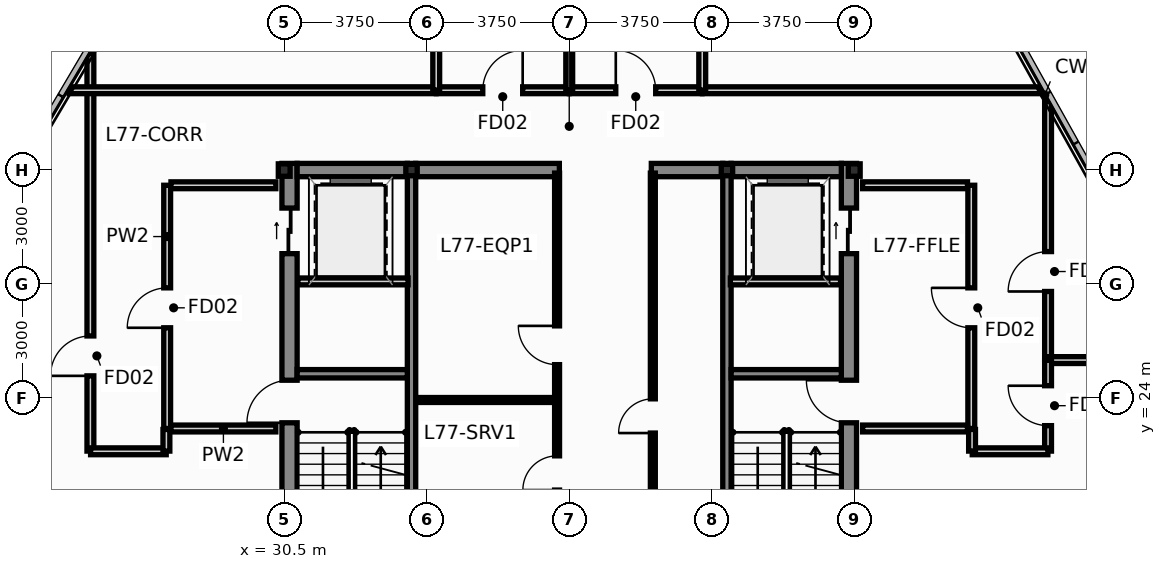
"""IFC4 building model, lengths in metres.
Left out: names, types, materials, properties, quantities, classifications, styles, units other than length and angle.
Written with IfcOpenShell. Run it as: python <this file> out.ifc"""

import sys

from ifc_helpers import new_model, si_unit, direction, frame, frame_2d, origin, origin_2d, place, context, subcontext, project, spatial, rectangle, hollow_rectangle, i_section, extrude, source, transform, mapped, element, fill, save


model = new_model("IFC4")
c1 = context("Model", 3, precision=1e-05, world=origin(), true_north=direction((0.0, 1.0)))
c2 = subcontext(c1, "Body", "Model", "MODEL_VIEW")
j1 = project(units=[si_unit("LENGTHUNIT", "METRE"), si_unit("PLANEANGLEUNIT", "RADIAN")], contexts=[c1])
p1 = place(None, origin())
s1 = spatial("IfcSite", under=j1, at=p1, CompositionType="ELEMENT")
p2 = place(p1, origin())
s2 = spatial("IfcBuilding", under=s1, at=p2, CompositionType="ELEMENT")
p3 = place(p2, frame((0.0, 0.0, 293.2)))
s3 = spatial("IfcBuildingStorey", under=s2, at=p3, CompositionType="ELEMENT", Elevation=293.2)
m1 = source(origin(), c2, "Body", "SweptSolid", [
    extrude(i_section(OverallWidth=0.311, OverallDepth=0.327, WebThickness=0.016, FlangeThickness=0.025, at=origin_2d()), origin(), (0.0, 0.0, 1.0), 3.4),
])
for number, where, z_axis, x_axis in (
    (1, (45.5, 30.0, 0.0), (0.0, 0.0, 1.0), (1.0, 0.0, 0.0)),
    (2, (30.5, 30.0, 0.0), (0.0, 0.0, 1.0), (1.0, 0.0, 0.0)),
):
    element("IfcColumn", number, at=place(p3, frame(where, z_axis=z_axis, x_axis=x_axis)), inside=s3, PredefinedType="COLUMN", context=c2, shape_type="MappedRepresentation", body=[
        mapped(m1, transform((0.0, 0.0, 0.0), scale=1.0)),
    ])
m2 = source(origin(), c2, "Body", "SweptSolid", [
    extrude(hollow_rectangle(XDim=0.3, YDim=0.3, WallThickness=0.012, at=origin_2d()), origin(), (0.0, 0.0, 1.0), 3.4),
])
for number, where, z_axis, x_axis in (
    (3, (33.85, 30.0, 0.0), (0.0, 0.0, 1.0), (1.0, 0.0, 0.0)),
    (4, (42.15, 30.0, 0.0), (0.0, 0.0, 1.0), (1.0, 0.0, 0.0)),
):
    element("IfcColumn", number, at=place(p3, frame(where, z_axis=z_axis, x_axis=x_axis)), inside=s3, PredefinedType="COLUMN", context=c2, shape_type="MappedRepresentation", body=[
        mapped(m2, transform((0.0, 0.0, 0.0), scale=1.0)),
    ])
p4 = place(p3, frame((30.64, 17.05, 0.0), z_axis=(0.0, 0.0, 1.0), x_axis=(0.0, 1.0, 0.0)))
e5 = element("IfcWall", 5, at=p4, inside=s3, PredefinedType="SHEAR", context=c2, shape_type="SweptSolid", body=[
    extrude(rectangle(XDim=13.125, YDim=0.4, at=frame_2d((6.562, 0.0))), origin(), (0.0, 0.0, 1.0), 3.4),
])
p5 = place(p4, frame((6.3, 0.0, 0.0)))
e6 = element("IfcOpeningElement", 6, at=p5, cuts=e5, PredefinedType="OPENING", context=c2, shape_type="SweptSolid", body=[
    extrude(rectangle(XDim=1.12, YDim=2.15, at=frame_2d((0.56, 1.075))), frame((0.0, 0.212, 0.0), z_axis=(0.0, -1.0, 0.0), x_axis=(1.0, 0.0, 0.0)), (0.0, 0.0, 1.0), 0.424),
])
p6 = place(p4, frame((10.75, 0.0, 0.0)))
e7 = element("IfcOpeningElement", 7, at=p6, cuts=e5, PredefinedType="OPENING", context=c2, shape_type="SweptSolid", body=[
    extrude(rectangle(XDim=1.2, YDim=2.2, at=frame_2d((0.6, 1.1))), frame((0.0, 0.212, 0.0), z_axis=(0.0, -1.0, 0.0), x_axis=(1.0, 0.0, 0.0)), (0.0, 0.0, 1.0), 0.424),
])
p7 = place(p3, frame((45.36, 17.05, 0.0), z_axis=(0.0, 0.0, 1.0), x_axis=(0.0, 1.0, 0.0)))
e8 = element("IfcWall", 8, at=p7, inside=s3, PredefinedType="SHEAR", context=c2, shape_type="SweptSolid", body=[
    extrude(rectangle(XDim=13.125, YDim=0.4, at=frame_2d((6.562, 0.0))), origin(), (0.0, 0.0, 1.0), 3.4),
])
p8 = place(p7, frame((6.3, 0.0, 0.0)))
e9 = element("IfcOpeningElement", 9, at=p8, cuts=e8, PredefinedType="OPENING", context=c2, shape_type="SweptSolid", body=[
    extrude(rectangle(XDim=1.12, YDim=2.15, at=frame_2d((0.56, 1.075))), frame((0.0, 0.212, 0.0), z_axis=(0.0, -1.0, 0.0), x_axis=(1.0, 0.0, 0.0)), (0.0, 0.0, 1.0), 0.424),
])
p9 = place(p7, frame((10.75, 0.0, 0.0)))
e10 = element("IfcOpeningElement", 10, at=p9, cuts=e8, PredefinedType="OPENING", context=c2, shape_type="SweptSolid", body=[
    extrude(rectangle(XDim=1.2, YDim=2.2, at=frame_2d((0.6, 1.1))), frame((0.0, 0.212, 0.0), z_axis=(0.0, -1.0, 0.0), x_axis=(1.0, 0.0, 0.0)), (0.0, 0.0, 1.0), 0.424),
])
p10 = place(p3, frame((30.84, 30.0, 0.0), z_axis=(0.0, 0.0, 1.0), x_axis=(1.0, 0.0, 0.0)))
e11 = element("IfcWall", 11, at=p10, inside=s3, PredefinedType="SHEAR", context=c2, shape_type="SweptSolid", body=[
    extrude(rectangle(XDim=2.9, YDim=0.35, at=frame_2d((1.45, 0.0))), origin(), (0.0, 0.0, 1.0), 3.4),
])
p11 = place(p3, frame((33.96, 30.0, 0.0), z_axis=(0.0, 0.0, 1.0), x_axis=(1.0, 0.0, 0.0)))
e12 = element("IfcWall", 12, at=p11, inside=s3, PredefinedType="SHEAR", context=c2, shape_type="SweptSolid", body=[
    extrude(rectangle(XDim=3.78, YDim=0.35, at=frame_2d((1.89, 0.0))), origin(), (0.0, 0.0, 1.0), 3.4),
])
p12 = place(p3, frame((40.16, 30.0, 0.0), z_axis=(0.0, 0.0, 1.0), x_axis=(1.0, 0.0, 0.0)))
e13 = element("IfcWall", 13, at=p12, inside=s3, PredefinedType="SHEAR", context=c2, shape_type="SweptSolid", body=[
    extrude(rectangle(XDim=1.88, YDim=0.35, at=frame_2d((0.94, 0.0))), origin(), (0.0, 0.0, 1.0), 3.4),
])
p13 = place(p3, frame((42.26, 30.0, 0.0), z_axis=(0.0, 0.0, 1.0), x_axis=(1.0, 0.0, 0.0)))
e14 = element("IfcWall", 14, at=p13, inside=s3, PredefinedType="SHEAR", context=c2, shape_type="SweptSolid", body=[
    extrude(rectangle(XDim=2.9, YDim=0.35, at=frame_2d((1.45, 0.0))), origin(), (0.0, 0.0, 1.0), 3.4),
])
for number, where, z_axis, x_axis in (
    (15, (33.85, 17.05, 0.0), (0.0, 0.0, 1.0), (0.0, 1.0, 0.0)),
    (16, (42.15, 17.05, 0.0), (0.0, 0.0, 1.0), (0.0, 1.0, 0.0)),
):
    element("IfcWall", number, at=place(p3, frame(where, z_axis=z_axis, x_axis=x_axis)), inside=s3, PredefinedType="SHEAR", context=c2, shape_type="SweptSolid", body=[
        extrude(rectangle(XDim=13.125, YDim=0.22, at=frame_2d((6.562, 0.0))), origin(), (0.0, 0.0, 1.0), 3.4),
    ])
for number, where, z_axis, x_axis in (
    (17, (30.84, 24.64, 0.0), (0.0, 0.0, 1.0), (1.0, 0.0, 0.0)),
    (18, (42.26, 24.64, 0.0), (0.0, 0.0, 1.0), (1.0, 0.0, 0.0)),
):
    element("IfcWall", number, at=place(p3, frame(where, z_axis=z_axis, x_axis=x_axis)), inside=s3, PredefinedType="SHEAR", context=c2, shape_type="SweptSolid", body=[
        extrude(rectangle(XDim=2.9, YDim=0.22, at=frame_2d((1.45, 0.0))), origin(), (0.0, 0.0, 1.0), 3.4),
    ])
p14 = place(p3, frame((27.42, 23.2, 0.0), z_axis=(0.0, 0.0, 1.0), x_axis=(0.0, 1.0, 0.0)))
e19 = element("IfcWall", 19, at=p14, inside=s3, PredefinedType="PARTITIONING", context=c2, shape_type="SweptSolid", body=[
    extrude(rectangle(XDim=6.4, YDim=0.18, at=frame_2d((3.2, 0.0))), origin(), (0.0, 0.0, 1.0), 2.835),
])
p15 = place(p14, frame((2.65, 0.0, 0.0)))
e20 = element("IfcOpeningElement", 20, at=p15, cuts=e19, PredefinedType="OPENING", context=c2, shape_type="SweptSolid", body=[
    extrude(rectangle(XDim=1.05, YDim=2.15, at=frame_2d((0.525, 1.075))), frame((0.0, 0.102, 0.0), z_axis=(0.0, -1.0, 0.0), x_axis=(1.0, 0.0, 0.0)), (0.0, 0.0, 1.0), 0.204),
])
for number, where, z_axis, x_axis in (
    (21, (27.52, 23.2, 0.0), (0.0, 0.0, 1.0), (1.0, 0.0, 0.0)),
    (22, (27.52, 29.6, 0.0), (0.0, 0.0, 1.0), (1.0, 0.0, 0.0)),
):
    element("IfcWall", number, at=place(p3, frame(where, z_axis=z_axis, x_axis=x_axis)), inside=s3, PredefinedType="PARTITIONING", context=c2, shape_type="SweptSolid", body=[
        extrude(rectangle(XDim=2.76, YDim=0.18, at=frame_2d((1.38, 0.0))), origin(), (0.0, 0.0, 1.0), 3.15),
    ])
p16 = place(p3, frame((48.58, 23.2, 0.0), z_axis=(0.0, 0.0, 1.0), x_axis=(0.0, 1.0, 0.0)))
e23 = element("IfcWall", 23, at=p16, inside=s3, PredefinedType="PARTITIONING", context=c2, shape_type="SweptSolid", body=[
    extrude(rectangle(XDim=6.4, YDim=0.18, at=frame_2d((3.2, 0.0))), origin(), (0.0, 0.0, 1.0), 2.835),
])
p17 = place(p16, frame((2.65, 0.0, 0.0)))
e24 = element("IfcOpeningElement", 24, at=p17, cuts=e23, PredefinedType="OPENING", context=c2, shape_type="SweptSolid", body=[
    extrude(rectangle(XDim=1.05, YDim=2.15, at=frame_2d((0.525, 1.075))), frame((0.0, 0.102, 0.0), z_axis=(0.0, -1.0, 0.0), x_axis=(1.0, 0.0, 0.0)), (0.0, 0.0, 1.0), 0.204),
])
for number, where, z_axis, x_axis in (
    (25, (45.72, 23.2, 0.0), (0.0, 0.0, 1.0), (1.0, 0.0, 0.0)),
    (26, (45.72, 29.6, 0.0), (0.0, 0.0, 1.0), (1.0, 0.0, 0.0)),
):
    element("IfcWall", number, at=place(p3, frame(where, z_axis=z_axis, x_axis=x_axis)), inside=s3, PredefinedType="PARTITIONING", context=c2, shape_type="SweptSolid", body=[
        extrude(rectangle(XDim=2.76, YDim=0.18, at=frame_2d((1.38, 0.0))), origin(), (0.0, 0.0, 1.0), 3.15),
    ])
for number, where, z_axis, x_axis in (
    (27, (30.86, 27.07, 0.0), (0.0, 0.0, 1.0), (1.0, 0.0, 0.0)),
    (28, (42.24, 27.07, 0.0), (0.0, 0.0, 1.0), (1.0, 0.0, 0.0)),
):
    element("IfcWall", number, at=place(p3, frame(where, z_axis=z_axis, x_axis=x_axis)), inside=s3, PredefinedType="PARTITIONING", context=c2, shape_type="SweptSolid", body=[
        extrude(rectangle(XDim=2.9, YDim=0.18, at=frame_2d((1.45, 0.0))), origin(), (0.0, 0.0, 1.0), 3.15),
    ])
p18 = place(p3, frame((34.02, 23.95, 0.0), z_axis=(0.0, 0.0, 1.0), x_axis=(1.0, 0.0, 0.0)))
e29 = element("IfcWall", 29, at=p18, inside=s3, PredefinedType="PARTITIONING", context=c2, shape_type="SweptSolid", body=[
    extrude(rectangle(XDim=3.58, YDim=0.13, at=frame_2d((1.79, 0.0))), origin(), (0.0, 0.0, 1.0), 3.15),
])
p19 = place(p3, frame((37.68, 20.48, 0.0), z_axis=(0.0, 0.0, 1.0), x_axis=(0.0, 1.0, 0.0)))
e30 = element("IfcWall", 30, at=p19, inside=s3, PredefinedType="PARTITIONING", context=c2, shape_type="SweptSolid", body=[
    extrude(rectangle(XDim=9.44, YDim=0.13, at=frame_2d((4.72, 0.0))), origin(), (0.0, 0.0, 1.0), 3.15),
])
p20 = place(p19, frame((1.1, 0.0, 0.0)))
e31 = element("IfcOpeningElement", 31, at=p20, cuts=e30, PredefinedType="OPENING", context=c2, shape_type="SweptSolid", body=[
    extrude(rectangle(XDim=0.9, YDim=2.1, at=frame_2d((0.45, 1.05))), frame((0.0, 0.077, 0.0), z_axis=(0.0, -1.0, 0.0), x_axis=(1.0, 0.0, 0.0)), (0.0, 0.0, 1.0), 0.154),
])
p21 = place(p19, frame((4.4, 0.0, 0.0)))
e32 = element("IfcOpeningElement", 32, at=p21, cuts=e30, PredefinedType="OPENING", context=c2, shape_type="SweptSolid", body=[
    extrude(rectangle(XDim=1.02, YDim=2.15, at=frame_2d((0.51, 1.075))), frame((0.0, 0.077, 0.0), z_axis=(0.0, -1.0, 0.0), x_axis=(1.0, 0.0, 0.0)), (0.0, 0.0, 1.0), 0.154),
])
p22 = place(p3, frame((40.2, 20.48, 0.0), z_axis=(0.0, 0.0, 1.0), x_axis=(0.0, 1.0, 0.0)))
e33 = element("IfcWall", 33, at=p22, inside=s3, PredefinedType="PARTITIONING", context=c2, shape_type="SweptSolid", body=[
    extrude(rectangle(XDim=9.44, YDim=0.13, at=frame_2d((4.72, 0.0))), origin(), (0.0, 0.0, 1.0), 3.15),
])
p23 = place(p22, frame((2.6, 0.0, 0.0)))
e34 = element("IfcOpeningElement", 34, at=p23, cuts=e33, PredefinedType="OPENING", context=c2, shape_type="SweptSolid", body=[
    extrude(rectangle(XDim=0.9, YDim=2.1, at=frame_2d((0.45, 1.05))), frame((0.0, 0.077, 0.0), z_axis=(0.0, -1.0, 0.0), x_axis=(1.0, 0.0, 0.0)), (0.0, 0.0, 1.0), 0.154),
])
p24 = place(p3, frame((25.4, 22.605, 0.0), z_axis=(0.0, 0.0, 1.0), x_axis=(0.0, 1.0, 0.0)))
e35 = element("IfcWall", 35, at=p24, inside=s3, PredefinedType="PARTITIONING", context=c2, shape_type="SweptSolid", body=[
    extrude(rectangle(XDim=10.456, YDim=0.18, at=frame_2d((5.228, 0.0))), origin(), (0.0, 0.0, 1.0), 2.835),
])
p25 = place(p24, frame((1.98, 0.0, 0.0)))
e36 = element("IfcOpeningElement", 36, at=p25, cuts=e35, PredefinedType="OPENING", context=c2, shape_type="SweptSolid", body=[
    extrude(rectangle(XDim=1.05, YDim=2.15, at=frame_2d((0.525, 1.075))), frame((0.0, 0.102, 0.0), z_axis=(0.0, -1.0, 0.0), x_axis=(1.0, 0.0, 0.0)), (0.0, 0.0, 1.0), 0.204),
])
p26 = place(p3, frame((24.84, 32.1, 0.0), z_axis=(0.0, 0.0, 1.0), x_axis=(1.0, 0.0, 0.0)))
e37 = element("IfcWall", 37, at=p26, inside=s3, PredefinedType="PARTITIONING", context=c2, shape_type="SweptSolid", body=[
    extrude(rectangle(XDim=9.655, YDim=0.18, at=frame_2d((4.827, 0.0))), origin(), (0.0, 0.0, 1.0), 2.835),
])
p27 = place(p3, frame((41.505, 32.1, 0.0), z_axis=(0.0, 0.0, 1.0), x_axis=(1.0, 0.0, 0.0)))
e38 = element("IfcWall", 38, at=p27, inside=s3, PredefinedType="PARTITIONING", context=c2, shape_type="SweptSolid", body=[
    extrude(rectangle(XDim=8.925, YDim=0.18, at=frame_2d((4.462, 0.0))), origin(), (0.0, 0.0, 1.0), 2.835),
])
p28 = place(p3, frame((50.6, 25.005, 0.0), z_axis=(0.0, 0.0, 1.0), x_axis=(0.0, 1.0, 0.0)))
e39 = element("IfcWall", 39, at=p28, inside=s3, PredefinedType="PARTITIONING", context=c2, shape_type="SweptSolid", body=[
    extrude(rectangle(XDim=6.795, YDim=0.18, at=frame_2d((3.397, 0.0))), origin(), (0.0, 0.0, 1.0), 2.835),
])
p29 = place(p28, frame((1.8, 0.0, 0.0)))
e40 = element("IfcOpeningElement", 40, at=p29, cuts=e39, PredefinedType="OPENING", context=c2, shape_type="SweptSolid", body=[
    extrude(rectangle(XDim=1.05, YDim=2.15, at=frame_2d((0.525, 1.075))), frame((0.0, 0.102, 0.0), z_axis=(0.0, -1.0, 0.0), x_axis=(1.0, 0.0, 0.0)), (0.0, 0.0, 1.0), 0.204),
])
p30 = place(p3, frame((50.605, 25.0, 0.0), z_axis=(0.0, 0.0, 1.0), x_axis=(1.0, 0.0, 0.0)))
e41 = element("IfcWall", 41, at=p30, inside=s3, PredefinedType="PARTITIONING", context=c2, shape_type="SweptSolid", body=[
    extrude(rectangle(XDim=3.785, YDim=0.18, at=frame_2d((1.893, 0.0))), origin(), (0.0, 0.0, 1.0), 3.15),
])
p31 = place(p3, frame((34.505, 32.1, 0.0), z_axis=(0.0, 0.0, 1.0), x_axis=(1.0, 0.0, 0.0)))
e42 = element("IfcWall", 42, at=p31, inside=s3, PredefinedType="PARTITIONING", context=c2, shape_type="SweptSolid", body=[
    extrude(rectangle(XDim=3.49, YDim=0.18, at=frame_2d((1.745, 0.0))), origin(), (0.0, 0.0, 1.0), 2.835),
])
p32 = place(p31, frame((1.22, 0.0, 0.0)))
e43 = element("IfcOpeningElement", 43, at=p32, cuts=e42, PredefinedType="OPENING", context=c2, shape_type="SweptSolid", body=[
    extrude(rectangle(XDim=1.05, YDim=2.15, at=frame_2d((0.525, 1.075))), frame((0.0, 0.102, 0.0), z_axis=(0.0, -1.0, 0.0), x_axis=(1.0, 0.0, 0.0)), (0.0, 0.0, 1.0), 0.204),
])
p33 = place(p3, frame((38.005, 32.1, 0.0), z_axis=(0.0, 0.0, 1.0), x_axis=(1.0, 0.0, 0.0)))
e44 = element("IfcWall", 44, at=p33, inside=s3, PredefinedType="PARTITIONING", context=c2, shape_type="SweptSolid", body=[
    extrude(rectangle(XDim=3.49, YDim=0.18, at=frame_2d((1.745, 0.0))), origin(), (0.0, 0.0, 1.0), 2.835),
])
p34 = place(p33, frame((1.22, 0.0, 0.0)))
e45 = element("IfcOpeningElement", 45, at=p34, cuts=e44, PredefinedType="OPENING", context=c2, shape_type="SweptSolid", body=[
    extrude(rectangle(XDim=1.05, YDim=2.15, at=frame_2d((0.525, 1.075))), frame((0.0, 0.102, 0.0), z_axis=(0.0, -1.0, 0.0), x_axis=(1.0, 0.0, 0.0)), (0.0, 0.0, 1.0), 0.204),
])
for number, where, z_axis, x_axis in (
    (46, (34.5, 32.105, 0.0), (0.0, 0.0, 1.0), (0.0, 1.0, 0.0)),
    (47, (38.0, 32.105, 0.0), (0.0, 0.0, 1.0), (0.0, 1.0, 0.0)),
    (48, (41.5, 35.495, 0.0), (0.0, 0.0, 1.0), (0.0, -1.0, 0.0)),
):
    element("IfcWall", number, at=place(p3, frame(where, z_axis=z_axis, x_axis=x_axis)), inside=s3, PredefinedType="PARTITIONING", context=c2, shape_type="SweptSolid", body=[
        extrude(rectangle(XDim=3.39, YDim=0.18, at=frame_2d((1.695, 0.0))), origin(), (0.0, 0.0, 1.0), 3.15),
    ])
p35 = place(p3, frame((50.6, 22.605, 0.0), z_axis=(0.0, 0.0, 1.0), x_axis=(0.0, 1.0, 0.0)))
e49 = element("IfcWall", 49, at=p35, inside=s3, PredefinedType="PARTITIONING", context=c2, shape_type="SweptSolid", body=[
    extrude(rectangle(XDim=2.39, YDim=0.18, at=frame_2d((1.195, 0.0))), origin(), (0.0, 0.0, 1.0), 2.835),
])
p36 = place(p35, frame((0.67, 0.0, 0.0)))
e50 = element("IfcOpeningElement", 50, at=p36, cuts=e49, PredefinedType="OPENING", context=c2, shape_type="SweptSolid", body=[
    extrude(rectangle(XDim=1.05, YDim=2.15, at=frame_2d((0.525, 1.075))), frame((0.0, 0.102, 0.0), z_axis=(0.0, -1.0, 0.0), x_axis=(1.0, 0.0, 0.0)), (0.0, 0.0, 1.0), 0.204),
])
for number, where, z_axis, x_axis in (
    (51, (27.395, 22.6, 0.0), (0.0, 0.0, 1.0), (-1.0, 0.0, 0.0)),
    (52, (48.605, 22.6, 0.0), (0.0, 0.0, 1.0), (1.0, 0.0, 0.0)),
):
    element("IfcWall", number, at=place(p3, frame(where, z_axis=z_axis, x_axis=x_axis)), inside=s3, PredefinedType="PARTITIONING", context=c2, shape_type="SweptSolid", body=[
        extrude(rectangle(XDim=1.99, YDim=0.18, at=frame_2d((0.995, 0.0))), origin(), (0.0, 0.0, 1.0), 3.15),
    ])
for number, where, z_axis, x_axis in (
    (53, (27.4, 23.175, 0.0), (0.0, 0.0, 1.0), (0.0, -1.0, 0.0)),
    (54, (48.6, 23.175, 0.0), (0.0, 0.0, 1.0), (0.0, -1.0, 0.0)),
):
    element("IfcWall", number, at=place(p3, frame(where, z_axis=z_axis, x_axis=x_axis)), inside=s3, PredefinedType="PARTITIONING", context=c2, shape_type="SweptSolid", body=[
        extrude(rectangle(XDim=0.57, YDim=0.18, at=frame_2d((0.285, 0.0))), origin(), (0.0, 0.0, 1.0), 2.835),
    ])
p37 = place(p5, origin())
e55 = element("IfcDoor", 55, at=p37, inside=s3, OperationType="SINGLE_SWING_LEFT", PredefinedType="DOOR", context=c2, shape_type="SweptSolid", body=[
    extrude(rectangle(XDim=1.12, YDim=2.15, at=frame_2d((0.56, 1.075))), frame((0.0, 0.025, 0.0), z_axis=(0.0, -1.0, 0.0), x_axis=(1.0, 0.0, 0.0)), (0.0, 0.0, 1.0), 0.05),
])
fill(e6, e55)
p38 = place(p6, origin())
e56 = element("IfcDoor", 56, at=p38, inside=s3, OperationType="SLIDING_TO_LEFT", PredefinedType="DOOR", context=c2, shape_type="SweptSolid", body=[
    extrude(rectangle(XDim=1.2, YDim=2.2, at=frame_2d((0.6, 1.1))), frame((0.0, 0.025, 0.0), z_axis=(0.0, -1.0, 0.0), x_axis=(1.0, 0.0, 0.0)), (0.0, 0.0, 1.0), 0.05),
])
fill(e7, e56)
p39 = place(p8, origin())
e57 = element("IfcDoor", 57, at=p39, inside=s3, OperationType="SINGLE_SWING_RIGHT", PredefinedType="DOOR", context=c2, shape_type="SweptSolid", body=[
    extrude(rectangle(XDim=1.12, YDim=2.15, at=frame_2d((0.56, 1.075))), frame((0.0, 0.025, 0.0), z_axis=(0.0, -1.0, 0.0), x_axis=(1.0, 0.0, 0.0)), (0.0, 0.0, 1.0), 0.05),
])
fill(e9, e57)
p40 = place(p9, origin())
e58 = element("IfcDoor", 58, at=p40, inside=s3, OperationType="SLIDING_TO_RIGHT", PredefinedType="DOOR", context=c2, shape_type="SweptSolid", body=[
    extrude(rectangle(XDim=1.2, YDim=2.2, at=frame_2d((0.6, 1.1))), frame((0.0, 0.025, 0.0), z_axis=(0.0, -1.0, 0.0), x_axis=(1.0, 0.0, 0.0)), (0.0, 0.0, 1.0), 0.05),
])
fill(e10, e58)
p41 = place(p15, origin())
e59 = element("IfcDoor", 59, at=p41, inside=s3, OperationType="SINGLE_SWING_LEFT", PredefinedType="DOOR", context=c2, shape_type="SweptSolid", body=[
    extrude(rectangle(XDim=1.05, YDim=2.15, at=frame_2d((0.525, 1.075))), frame((0.0, 0.025, 0.0), z_axis=(0.0, -1.0, 0.0), x_axis=(1.0, 0.0, 0.0)), (0.0, 0.0, 1.0), 0.05),
])
fill(e20, e59)
p42 = place(p17, origin())
e60 = element("IfcDoor", 60, at=p42, inside=s3, OperationType="SINGLE_SWING_RIGHT", PredefinedType="DOOR", context=c2, shape_type="SweptSolid", body=[
    extrude(rectangle(XDim=1.05, YDim=2.15, at=frame_2d((0.525, 1.075))), frame((0.0, 0.025, 0.0), z_axis=(0.0, -1.0, 0.0), x_axis=(1.0, 0.0, 0.0)), (0.0, 0.0, 1.0), 0.05),
])
fill(e24, e60)
p43 = place(p20, origin())
e61 = element("IfcDoor", 61, at=p43, inside=s3, OperationType="SINGLE_SWING_LEFT", PredefinedType="DOOR", context=c2, shape_type="SweptSolid", body=[
    extrude(rectangle(XDim=0.9, YDim=2.1, at=frame_2d((0.45, 1.05))), frame((0.0, 0.025, 0.0), z_axis=(0.0, -1.0, 0.0), x_axis=(1.0, 0.0, 0.0)), (0.0, 0.0, 1.0), 0.05),
])
fill(e31, e61)
p44 = place(p21, origin())
e62 = element("IfcDoor", 62, at=p44, inside=s3, OperationType="SINGLE_SWING_RIGHT", PredefinedType="DOOR", context=c2, shape_type="SweptSolid", body=[
    extrude(rectangle(XDim=1.02, YDim=2.15, at=frame_2d((0.51, 1.075))), frame((0.0, 0.025, 0.0), z_axis=(0.0, -1.0, 0.0), x_axis=(1.0, 0.0, 0.0)), (0.0, 0.0, 1.0), 0.05),
])
fill(e32, e62)
p45 = place(p23, origin())
e63 = element("IfcDoor", 63, at=p45, inside=s3, OperationType="SINGLE_SWING_LEFT", PredefinedType="DOOR", context=c2, shape_type="SweptSolid", body=[
    extrude(rectangle(XDim=0.9, YDim=2.1, at=frame_2d((0.45, 1.05))), frame((0.0, 0.025, 0.0), z_axis=(0.0, -1.0, 0.0), x_axis=(1.0, 0.0, 0.0)), (0.0, 0.0, 1.0), 0.05),
])
fill(e34, e63)
p46 = place(p25, origin())
e64 = element("IfcDoor", 64, at=p46, inside=s3, OperationType="SINGLE_SWING_LEFT", PredefinedType="DOOR", context=c2, shape_type="SweptSolid", body=[
    extrude(rectangle(XDim=1.05, YDim=2.15, at=frame_2d((0.525, 1.075))), frame((0.0, 0.025, 0.0), z_axis=(0.0, -1.0, 0.0), x_axis=(1.0, 0.0, 0.0)), (0.0, 0.0, 1.0), 0.05),
])
fill(e36, e64)
p47 = place(p29, origin())
e65 = element("IfcDoor", 65, at=p47, inside=s3, OperationType="SINGLE_SWING_LEFT", PredefinedType="DOOR", context=c2, shape_type="SweptSolid", body=[
    extrude(rectangle(XDim=1.05, YDim=2.15, at=frame_2d((0.525, 1.075))), frame((0.0, 0.025, 0.0), z_axis=(0.0, -1.0, 0.0), x_axis=(1.0, 0.0, 0.0)), (0.0, 0.0, 1.0), 0.05),
])
fill(e40, e65)
p48 = place(p32, origin())
e66 = element("IfcDoor", 66, at=p48, inside=s3, OperationType="SINGLE_SWING_RIGHT", PredefinedType="DOOR", context=c2, shape_type="SweptSolid", body=[
    extrude(rectangle(XDim=1.05, YDim=2.15, at=frame_2d((0.525, 1.075))), frame((0.0, 0.025, 0.0), z_axis=(0.0, -1.0, 0.0), x_axis=(1.0, 0.0, 0.0)), (0.0, 0.0, 1.0), 0.05),
])
fill(e43, e66)
p49 = place(p34, origin())
e67 = element("IfcDoor", 67, at=p49, inside=s3, OperationType="SINGLE_SWING_LEFT", PredefinedType="DOOR", context=c2, shape_type="SweptSolid", body=[
    extrude(rectangle(XDim=1.05, YDim=2.15, at=frame_2d((0.525, 1.075))), frame((0.0, 0.025, 0.0), z_axis=(0.0, -1.0, 0.0), x_axis=(1.0, 0.0, 0.0)), (0.0, 0.0, 1.0), 0.05),
])
fill(e45, e67)
p50 = place(p36, origin())
e68 = element("IfcDoor", 68, at=p50, inside=s3, OperationType="SINGLE_SWING_RIGHT", PredefinedType="DOOR", context=c2, shape_type="SweptSolid", body=[
    extrude(rectangle(XDim=1.05, YDim=2.15, at=frame_2d((0.525, 1.075))), frame((0.0, 0.025, 0.0), z_axis=(0.0, -1.0, 0.0), x_axis=(1.0, 0.0, 0.0)), (0.0, 0.0, 1.0), 0.05),
])
fill(e50, e68)
save(model, sys.argv[1])
